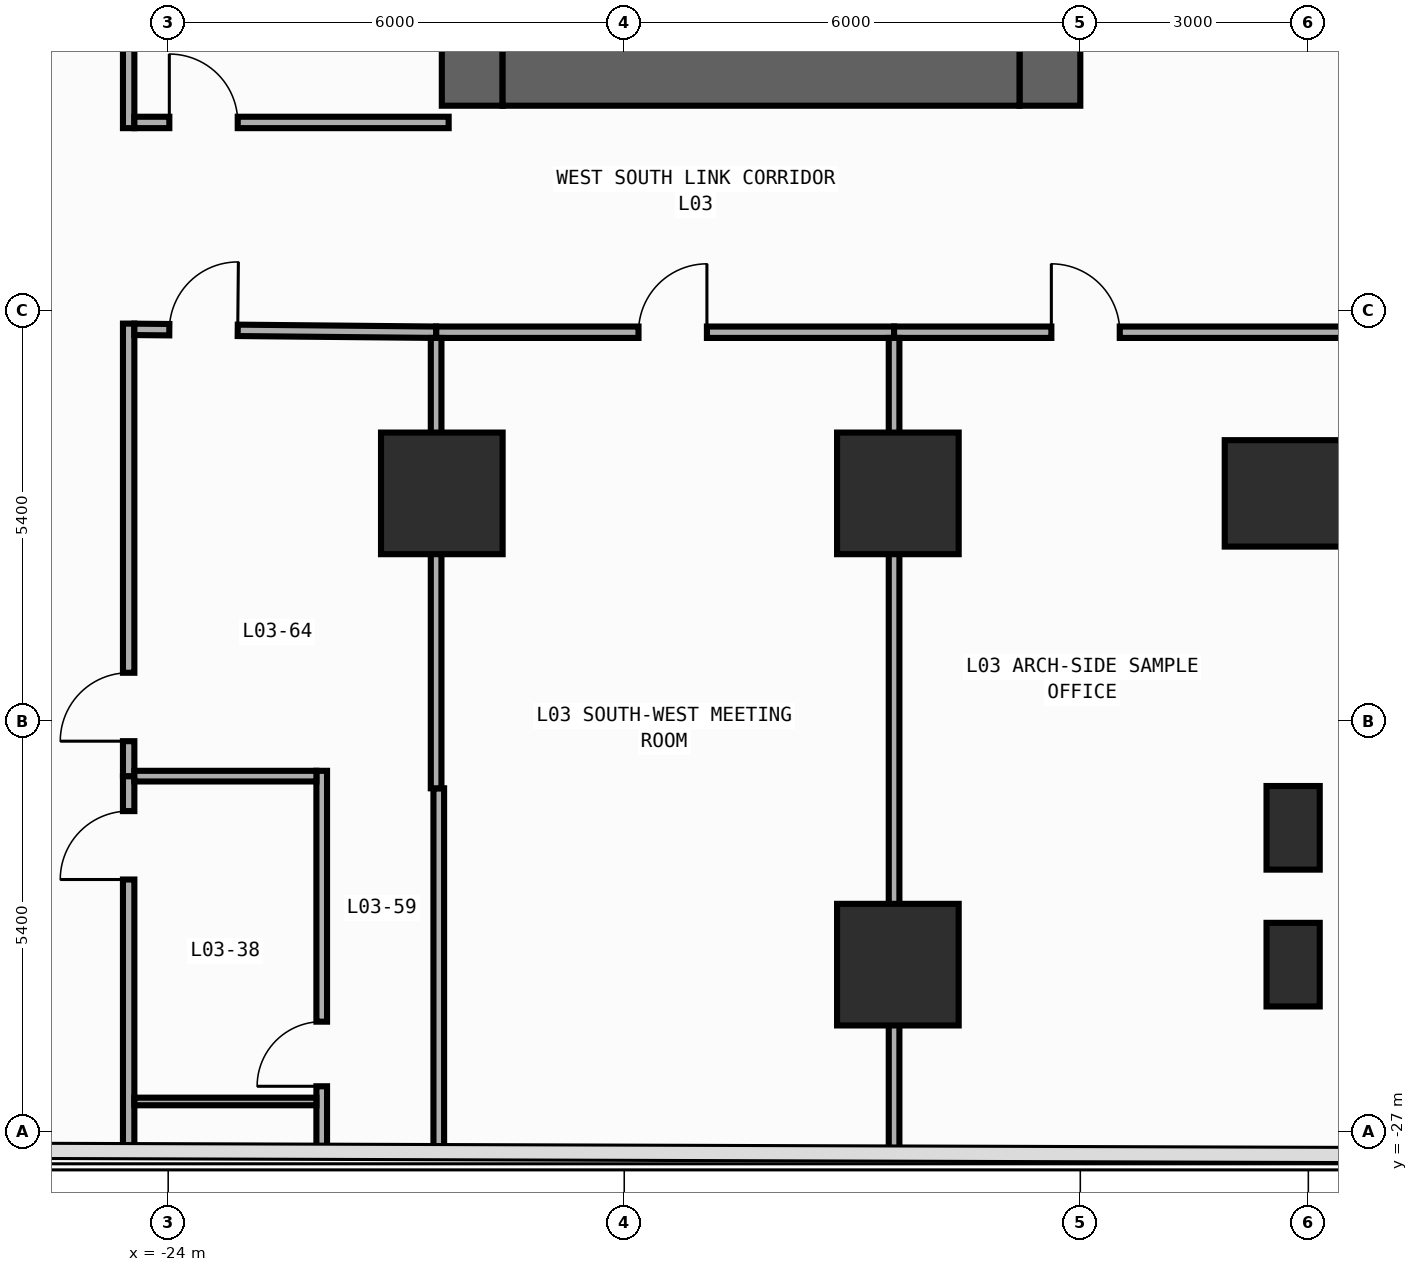
"""IFC4 building model, lengths in metres.
Left out: names, types, materials, properties, quantities, classifications, styles, units other than length and angle.
Written with IfcOpenShell. Run it as: python <this file> out.ifc"""

import sys

from ifc_helpers import new_model, si_unit, direction, frame, frame_2d, origin, origin_2d, place, context, subcontext, project, spatial, rectangle, extrude, element, fill, save


model = new_model("IFC4")
c1 = context("Model", 3, precision=1e-05, world=origin(), true_north=direction((0.0, 1.0)))
c2 = subcontext(c1, "Body", "Model", "MODEL_VIEW")
j1 = project(units=[si_unit("LENGTHUNIT", "METRE"), si_unit("PLANEANGLEUNIT", "RADIAN")], contexts=[c1])
p1 = place(None, origin())
s1 = spatial("IfcSite", under=j1, at=p1, CompositionType="ELEMENT")
p2 = place(p1, origin())
s2 = spatial("IfcBuilding", under=s1, at=p2, CompositionType="ELEMENT")
p3 = place(p2, frame((0.0, 0.0, 11.0)))
s3 = spatial("IfcBuildingStorey", under=s2, at=p3, CompositionType="ELEMENT", Elevation=11.0)
p4 = place(p3, frame((-20.0, -13.5, 0.0), z_axis=(0.0, 0.0, 1.0), x_axis=(0.0, 1.0, 0.0)))
e1 = element("IfcWall", 1, at=p4, inside=s3, PredefinedType="SHEAR", context=c2, shape_type="SweptSolid", body=[
    extrude(rectangle(XDim=27.0, YDim=0.8, at=frame_2d((13.5, 0.0))), origin(), (0.0, 0.0, 1.0), 4.7),
])
p5 = place(p3, frame((-12.4, -13.5, 0.0), z_axis=(0.0, 0.0, 1.0), x_axis=(0.0, 1.0, 0.0)))
e2 = element("IfcWall", 2, at=p5, inside=s3, PredefinedType="SHEAR", context=c2, shape_type="SweptSolid", body=[
    extrude(rectangle(XDim=27.0, YDim=0.8, at=frame_2d((13.5, 0.0))), origin(), (0.0, 0.0, 1.0), 4.7),
])
p6 = place(p5, frame((21.55, 0.0, 0.0)))
e3 = element("IfcOpeningElement", 3, at=p6, cuts=e2, PredefinedType="OPENING", context=c2, shape_type="SweptSolid", body=[
    extrude(rectangle(XDim=1.1, YDim=2.2, at=frame_2d((0.55, 1.1))), frame((0.0, 0.41, 0.0), z_axis=(0.0, -1.0, 0.0), x_axis=(1.0, 0.0, 0.0)), (0.0, 0.0, 1.0), 0.82),
])
p7 = place(p5, frame((18.35, 0.0, 0.0)))
e4 = element("IfcOpeningElement", 4, at=p7, cuts=e2, PredefinedType="OPENING", context=c2, shape_type="SweptSolid", body=[
    extrude(rectangle(XDim=1.1, YDim=2.2, at=frame_2d((0.55, 1.1))), frame((0.0, 0.41, 0.0), z_axis=(0.0, -1.0, 0.0), x_axis=(1.0, 0.0, 0.0)), (0.0, 0.0, 1.0), 0.82),
])
p8 = place(p5, frame((15.15, 0.0, 0.0)))
e5 = element("IfcOpeningElement", 5, at=p8, cuts=e2, PredefinedType="OPENING", context=c2, shape_type="SweptSolid", body=[
    extrude(rectangle(XDim=1.1, YDim=2.2, at=frame_2d((0.55, 1.1))), frame((0.0, 0.41, 0.0), z_axis=(0.0, -1.0, 0.0), x_axis=(1.0, 0.0, 0.0)), (0.0, 0.0, 1.0), 0.82),
])
p9 = place(p5, frame((10.35, 0.0, 0.0)))
e6 = element("IfcOpeningElement", 6, at=p9, cuts=e2, PredefinedType="OPENING", context=c2, shape_type="SweptSolid", body=[
    extrude(rectangle(XDim=1.1, YDim=2.2, at=frame_2d((0.55, 1.1))), frame((0.0, 0.41, 0.0), z_axis=(0.0, -1.0, 0.0), x_axis=(1.0, 0.0, 0.0)), (0.0, 0.0, 1.0), 0.82),
])
p10 = place(p5, frame((7.15, 0.0, 0.0)))
e7 = element("IfcOpeningElement", 7, at=p10, cuts=e2, PredefinedType="OPENING", context=c2, shape_type="SweptSolid", body=[
    extrude(rectangle(XDim=1.1, YDim=2.2, at=frame_2d((0.55, 1.1))), frame((0.0, 0.41, 0.0), z_axis=(0.0, -1.0, 0.0), x_axis=(1.0, 0.0, 0.0)), (0.0, 0.0, 1.0), 0.82),
])
p11 = place(p5, frame((3.95, 0.0, 0.0)))
e8 = element("IfcOpeningElement", 8, at=p11, cuts=e2, PredefinedType="OPENING", context=c2, shape_type="SweptSolid", body=[
    extrude(rectangle(XDim=1.1, YDim=2.2, at=frame_2d((0.55, 1.1))), frame((0.0, 0.41, 0.0), z_axis=(0.0, -1.0, 0.0), x_axis=(1.0, 0.0, 0.0)), (0.0, 0.0, 1.0), 0.82),
])
p12 = place(p5, frame((12.725, 0.0, 0.0)))
e9 = element("IfcOpeningElement", 9, at=p12, cuts=e2, PredefinedType="OPENING", context=c2, shape_type="SweptSolid", body=[
    extrude(rectangle(XDim=1.15, YDim=2.2, at=frame_2d((0.575, 1.1))), frame((0.0, 0.41, 0.0), z_axis=(0.0, -1.0, 0.0), x_axis=(1.0, 0.0, 0.0)), (0.0, 0.0, 1.0), 0.82),
])
p13 = place(p5, frame((1.625, 0.0, 0.0)))
e10 = element("IfcOpeningElement", 10, at=p13, cuts=e2, PredefinedType="OPENING", context=c2, shape_type="SweptSolid", body=[
    extrude(rectangle(XDim=0.85, YDim=2.1, at=frame_2d((0.425, 1.05))), frame((0.0, 0.41, 0.0), z_axis=(0.0, -1.0, 0.0), x_axis=(1.0, 0.0, 0.0)), (0.0, 0.0, 1.0), 0.82),
])
p14 = place(p3, frame((-19.6, -13.1, 0.0), z_axis=(0.0, 0.0, 1.0), x_axis=(1.0, 0.0, 0.0)))
e11 = element("IfcWall", 11, at=p14, inside=s3, PredefinedType="SHEAR", context=c2, shape_type="SweptSolid", body=[
    extrude(rectangle(XDim=6.8, YDim=0.8, at=frame_2d((3.4, 0.0))), origin(), (0.0, 0.0, 1.0), 4.7),
])
p15 = place(p3, frame((-9.2, -18.6, 0.0), z_axis=(0.0, 0.0, 1.0), x_axis=(1.0, 0.0, 0.0)))
e12 = element("IfcColumn", 12, at=p15, inside=s3, PredefinedType="COLUMN", context=c2, shape_type="SweptSolid", body=[
    extrude(rectangle(XDim=1.8, YDim=1.4, at=origin_2d()), origin(), (0.0, 0.0, 1.0), 5.0),
])
for number, where, z_axis, x_axis in (
    (13, (-20.4, -18.6, 0.0), (0.0, 0.0, 1.0), (1.0, 0.0, 0.0)),
    (14, (-14.4, -18.6, 0.0), (0.0, 0.0, 1.0), (1.0, 0.0, 0.0)),
):
    element("IfcColumn", number, at=place(p3, frame(where, z_axis=z_axis, x_axis=x_axis)), inside=s3, PredefinedType="COLUMN", context=c2, shape_type="SweptSolid", body=[
        extrude(rectangle(XDim=1.6, YDim=1.6, at=origin_2d()), origin(), (0.0, 0.0, 1.0), 5.0),
    ])
p16 = place(p3, frame((-9.2, -24.8, 0.0), z_axis=(0.0, 0.0, 1.0), x_axis=(1.0, 0.0, 0.0)))
e15 = element("IfcColumn", 15, at=p16, inside=s3, PredefinedType="PILASTER", context=c2, shape_type="SweptSolid", body=[
    extrude(rectangle(XDim=0.7, YDim=1.1, at=origin_2d()), origin(), (0.0, 0.0, 1.0), 5.0),
])
p17 = place(p3, frame((-14.4, -24.8, 0.0), z_axis=(0.0, 0.0, 1.0), x_axis=(1.0, 0.0, 0.0)))
e16 = element("IfcColumn", 16, at=p17, inside=s3, PredefinedType="COLUMN", context=c2, shape_type="SweptSolid", body=[
    extrude(rectangle(XDim=1.6, YDim=1.6, at=origin_2d()), origin(), (0.0, 0.0, 1.0), 5.0),
])
p18 = place(p3, frame((-9.2, -23.0, 0.0), z_axis=(0.0, 0.0, 1.0), x_axis=(1.0, 0.0, 0.0)))
e17 = element("IfcColumn", 17, at=p18, inside=s3, PredefinedType="PILASTER", context=c2, shape_type="SweptSolid", body=[
    extrude(rectangle(XDim=0.7, YDim=1.1, at=origin_2d()), origin(), (0.0, 0.0, 1.0), 5.0),
])
p19 = place(p3, frame((-24.52, -27.258, 0.0), z_axis=(0.0, 0.0, 1.0), x_axis=(0.0, 1.0, 0.0)))
e18 = element("IfcWall", 18, at=p19, inside=s3, PredefinedType="PARTITIONING", context=c2, shape_type="SweptSolid", body=[
    extrude(rectangle(XDim=4.938, YDim=0.15, at=frame_2d((2.469, 0.0))), origin(), (0.0, 0.0, 1.0), 4.7),
])
p20 = place(p19, frame((3.578, 0.0, 0.0)))
e19 = element("IfcOpeningElement", 19, at=p20, cuts=e18, PredefinedType="OPENING", context=c2, shape_type="SweptSolid", body=[
    extrude(rectangle(XDim=0.9, YDim=2.15, at=frame_2d((0.45, 1.075))), frame((0.0, 0.085, 0.0), z_axis=(0.0, -1.0, 0.0), x_axis=(1.0, 0.0, 0.0)), (0.0, 0.0, 1.0), 0.17),
])
p21 = place(p3, frame((-24.52, -13.795, 0.0), z_axis=(0.0, 0.0, 1.0), x_axis=(0.0, 1.0, 0.0)))
e20 = element("IfcWall", 20, at=p21, inside=s3, PredefinedType="PARTITIONING", context=c2, shape_type="SweptSolid", body=[
    extrude(rectangle(XDim=25.23, YDim=0.15, at=frame_2d((12.615, 0.0))), origin(), (0.0, 0.0, 1.0), 4.7),
])
p22 = place(p21, frame((7.863, 0.0, 0.0)))
e21 = element("IfcOpeningElement", 21, at=p22, cuts=e20, PredefinedType="OPENING", context=c2, shape_type="SweptSolid", body=[
    extrude(rectangle(XDim=0.9, YDim=2.15, at=frame_2d((0.45, 1.075))), frame((0.0, 0.085, 0.0), z_axis=(0.0, -1.0, 0.0), x_axis=(1.0, 0.0, 0.0)), (0.0, 0.0, 1.0), 0.17),
])
p23 = place(p3, frame((-24.52, -22.32, 0.0), z_axis=(0.0, 0.0, 1.0), x_axis=(0.0, 1.0, 0.0)))
e22 = element("IfcWall", 22, at=p23, inside=s3, PredefinedType="PARTITIONING", context=c2, shape_type="SweptSolid", body=[
    extrude(rectangle(XDim=5.954, YDim=0.15, at=frame_2d((2.977, 0.0))), origin(), (0.0, 0.0, 1.0), 4.7),
])
p24 = place(p23, frame((0.46, 0.0, 0.0)))
e23 = element("IfcOpeningElement", 23, at=p24, cuts=e22, PredefinedType="OPENING", context=c2, shape_type="SweptSolid", body=[
    extrude(rectangle(XDim=0.9, YDim=2.15, at=frame_2d((0.45, 1.075))), frame((0.0, 0.085, 0.0), z_axis=(0.0, -1.0, 0.0), x_axis=(1.0, 0.0, 0.0)), (0.0, 0.0, 1.0), 0.17),
])
p25 = place(p3, frame((-24.445, -13.72, 0.0), z_axis=(0.0, 0.0, 1.0), x_axis=(1.0, 0.0, 0.0)))
e24 = element("IfcWall", 24, at=p25, inside=s3, PredefinedType="PARTITIONING", context=c2, shape_type="SweptSolid", body=[
    extrude(rectangle(XDim=4.135, YDim=0.15, at=frame_2d((2.067, 0.0))), origin(), (0.0, 0.0, 1.0), 4.7),
])
p26 = place(p25, frame((0.46, 0.0, 0.0)))
e25 = element("IfcOpeningElement", 25, at=p26, cuts=e24, PredefinedType="OPENING", context=c2, shape_type="SweptSolid", body=[
    extrude(rectangle(XDim=0.9, YDim=2.15, at=frame_2d((0.45, 1.075))), frame((0.0, 0.085, 0.0), z_axis=(0.0, -1.0, 0.0), x_axis=(1.0, 0.0, 0.0)), (0.0, 0.0, 1.0), 0.17),
])
p27 = place(p3, frame((-20.475, -16.48, 0.0), z_axis=(0.0, 0.0, 1.0), x_axis=(1.0, 0.0, 0.0)))
e26 = element("IfcWall", 26, at=p27, inside=s3, PredefinedType="PARTITIONING", context=c2, shape_type="SweptSolid", body=[
    extrude(rectangle(XDim=6.025, YDim=0.15, at=frame_2d((3.013, 0.0))), origin(), (0.0, 0.0, 1.0), 4.7),
])
p28 = place(p27, frame((2.663, 0.0, 0.0)))
e27 = element("IfcOpeningElement", 27, at=p28, cuts=e26, PredefinedType="OPENING", context=c2, shape_type="SweptSolid", body=[
    extrude(rectangle(XDim=0.9, YDim=2.15, at=frame_2d((0.45, 1.075))), frame((0.0, 0.085, 0.0), z_axis=(0.0, -1.0, 0.0), x_axis=(1.0, 0.0, 0.0)), (0.0, 0.0, 1.0), 0.17),
])
p29 = place(p3, frame((-14.45, -16.48, 0.0), z_axis=(0.0, 0.0, 1.0), x_axis=(1.0, 0.0, 0.0)))
e28 = element("IfcWall", 28, at=p29, inside=s3, PredefinedType="PARTITIONING", context=c2, shape_type="SweptSolid", body=[
    extrude(rectangle(XDim=6.245, YDim=0.15, at=frame_2d((3.123, 0.0))), origin(), (0.0, 0.0, 1.0), 4.7),
])
p30 = place(p29, frame((2.069, 0.0, 0.0)))
e29 = element("IfcOpeningElement", 29, at=p30, cuts=e28, PredefinedType="OPENING", context=c2, shape_type="SweptSolid", body=[
    extrude(rectangle(XDim=0.9, YDim=2.15, at=frame_2d((0.45, 1.075))), frame((0.0, 0.085, 0.0), z_axis=(0.0, -1.0, 0.0), x_axis=(1.0, 0.0, 0.0)), (0.0, 0.0, 1.0), 0.17),
])
p31 = place(p3, frame((-24.445, -16.442, 0.0), z_axis=(0.0, 0.0, 1.0), x_axis=(0.999954573497, -0.009531576096, 0.0)))
e30 = element("IfcWall", 30, at=p31, inside=s3, PredefinedType="PARTITIONING", context=c2, shape_type="SweptSolid", body=[
    extrude(rectangle(XDim=3.97, YDim=0.15, at=frame_2d((1.985, 0.0))), origin(), (0.0, 0.0, 1.0), 4.7),
])
p32 = place(p31, frame((0.46, 0.0, 0.0)))
e31 = element("IfcOpeningElement", 31, at=p32, cuts=e30, PredefinedType="OPENING", context=c2, shape_type="SweptSolid", body=[
    extrude(rectangle(XDim=0.9, YDim=2.15, at=frame_2d((0.45, 1.075))), frame((0.0, 0.085, 0.0), z_axis=(0.0, -1.0, 0.0), x_axis=(1.0, 0.0, 0.0)), (0.0, 0.0, 1.0), 0.17),
])
p33 = place(p3, frame((-21.98, -27.266, 0.0), z_axis=(0.0, 0.0, 1.0), x_axis=(0.0, 1.0, 0.0)))
e32 = element("IfcWall", 32, at=p33, inside=s3, PredefinedType="PARTITIONING", context=c2, shape_type="SweptSolid", body=[
    extrude(rectangle(XDim=5.016, YDim=0.14, at=frame_2d((2.508, 0.0))), origin(), (0.0, 0.0, 1.0), 4.7),
])
p34 = place(p33, frame((0.866, 0.0, 0.0)))
e33 = element("IfcOpeningElement", 33, at=p34, cuts=e32, PredefinedType="OPENING", context=c2, shape_type="SweptSolid", body=[
    extrude(rectangle(XDim=0.85, YDim=2.1, at=frame_2d((0.425, 1.05))), frame((0.0, 0.08, 0.0), z_axis=(0.0, -1.0, 0.0), x_axis=(1.0, 0.0, 0.0)), (0.0, 0.0, 1.0), 0.16),
])
p35 = place(p3, frame((-24.445, -22.32, 0.0), z_axis=(0.0, 0.0, 1.0), x_axis=(1.0, 0.0, 0.0)))
e34 = element("IfcWall", 34, at=p35, inside=s3, PredefinedType="PARTITIONING", context=c2, shape_type="SweptSolid", body=[
    extrude(rectangle(XDim=2.395, YDim=0.14, at=frame_2d((1.198, 0.0))), origin(), (0.0, 0.0, 1.0), 4.7),
])
p36 = place(p3, frame((-14.45, -27.29, 0.0), z_axis=(0.0, 0.0, 1.0), x_axis=(0.0, 1.0, 0.0)))
e35 = element("IfcWall", 35, at=p36, inside=s3, PredefinedType="PARTITIONING", context=c2, shape_type="SweptSolid", body=[
    extrude(rectangle(XDim=10.735, YDim=0.14, at=frame_2d((5.367, 0.0))), origin(), (0.0, 0.0, 1.0), 3.8),
])
p37 = place(p3, frame((-20.44, -27.271, 0.0), z_axis=(0.0, 0.0, 1.0), x_axis=(0.0, 1.0, 0.0)))
e36 = element("IfcWall", 36, at=p37, inside=s3, PredefinedType="PARTITIONING", context=c2, shape_type="SweptSolid", body=[
    extrude(rectangle(XDim=4.791, YDim=0.14, at=frame_2d((2.396, 0.0))), origin(), (0.0, 0.0, 1.0), 4.7),
])
p38 = place(p3, frame((-20.475, -22.48, 0.0), z_axis=(0.0, 0.0, 1.0), x_axis=(0.0, 1.0, 0.0)))
e37 = element("IfcWall", 37, at=p38, inside=s3, PredefinedType="PARTITIONING", context=c2, shape_type="SweptSolid", body=[
    extrude(rectangle(XDim=5.925, YDim=0.14, at=frame_2d((2.962, 0.0))), origin(), (0.0, 0.0, 1.0), 4.7),
])
p39 = place(p3, frame((-22.05, -26.6, 0.0), z_axis=(0.0, 0.0, 1.0), x_axis=(-1.0, 0.0, 0.0)))
e38 = element("IfcWall", 38, at=p39, inside=s3, PredefinedType="PARTITIONING", context=c2, shape_type="SweptSolid", body=[
    extrude(rectangle(XDim=2.395, YDim=0.1, at=frame_2d((1.198, 0.0))), origin(), (0.0, 0.0, 1.0), 4.7),
])
p40 = place(p20, origin())
e39 = element("IfcDoor", 39, at=p40, inside=s3, OperationType="SINGLE_SWING_LEFT", PredefinedType="DOOR", context=c2, shape_type="SweptSolid", body=[
    extrude(rectangle(XDim=0.9, YDim=2.15, at=frame_2d((0.45, 1.075))), frame((0.0, 0.025, 0.0), z_axis=(0.0, -1.0, 0.0), x_axis=(1.0, 0.0, 0.0)), (0.0, 0.0, 1.0), 0.05),
])
fill(e19, e39)
p41 = place(p24, origin())
e40 = element("IfcDoor", 40, at=p41, inside=s3, OperationType="SINGLE_SWING_LEFT", PredefinedType="DOOR", context=c2, shape_type="SweptSolid", body=[
    extrude(rectangle(XDim=0.9, YDim=2.15, at=frame_2d((0.45, 1.075))), frame((0.0, 0.025, 0.0), z_axis=(0.0, -1.0, 0.0), x_axis=(1.0, 0.0, 0.0)), (0.0, 0.0, 1.0), 0.05),
])
fill(e23, e40)
p42 = place(p26, origin())
e41 = element("IfcDoor", 41, at=p42, inside=s3, OperationType="SINGLE_SWING_LEFT", PredefinedType="DOOR", context=c2, shape_type="SweptSolid", body=[
    extrude(rectangle(XDim=0.9, YDim=2.15, at=frame_2d((0.45, 1.075))), frame((0.0, 0.025, 0.0), z_axis=(0.0, -1.0, 0.0), x_axis=(1.0, 0.0, 0.0)), (0.0, 0.0, 1.0), 0.05),
])
fill(e25, e41)
p43 = place(p28, origin())
e42 = element("IfcDoor", 42, at=p43, inside=s3, OperationType="SINGLE_SWING_RIGHT", PredefinedType="DOOR", context=c2, shape_type="SweptSolid", body=[
    extrude(rectangle(XDim=0.9, YDim=2.15, at=frame_2d((0.45, 1.075))), frame((0.0, 0.025, 0.0), z_axis=(0.0, -1.0, 0.0), x_axis=(1.0, 0.0, 0.0)), (0.0, 0.0, 1.0), 0.05),
])
fill(e27, e42)
p44 = place(p30, origin())
e43 = element("IfcDoor", 43, at=p44, inside=s3, OperationType="SINGLE_SWING_LEFT", PredefinedType="DOOR", context=c2, shape_type="SweptSolid", body=[
    extrude(rectangle(XDim=0.9, YDim=2.15, at=frame_2d((0.45, 1.075))), frame((0.0, 0.025, 0.0), z_axis=(0.0, -1.0, 0.0), x_axis=(1.0, 0.0, 0.0)), (0.0, 0.0, 1.0), 0.05),
])
fill(e29, e43)
p45 = place(p32, origin())
e44 = element("IfcDoor", 44, at=p45, inside=s3, OperationType="SINGLE_SWING_RIGHT", PredefinedType="DOOR", context=c2, shape_type="SweptSolid", body=[
    extrude(rectangle(XDim=0.9, YDim=2.15, at=frame_2d((0.45, 1.075))), frame((0.0, 0.025, 0.0), z_axis=(0.0, -1.0, 0.0), x_axis=(1.0, 0.0, 0.0)), (0.0, 0.0, 1.0), 0.05),
])
fill(e31, e44)
p46 = place(p34, origin())
e45 = element("IfcDoor", 45, at=p46, inside=s3, OperationType="SINGLE_SWING_LEFT", PredefinedType="DOOR", context=c2, shape_type="SweptSolid", body=[
    extrude(rectangle(XDim=0.85, YDim=2.1, at=frame_2d((0.425, 1.05))), frame((0.0, 0.025, 0.0), z_axis=(0.0, -1.0, 0.0), x_axis=(1.0, 0.0, 0.0)), (0.0, 0.0, 1.0), 0.05),
])
fill(e33, e45)
save(model, sys.argv[1])
